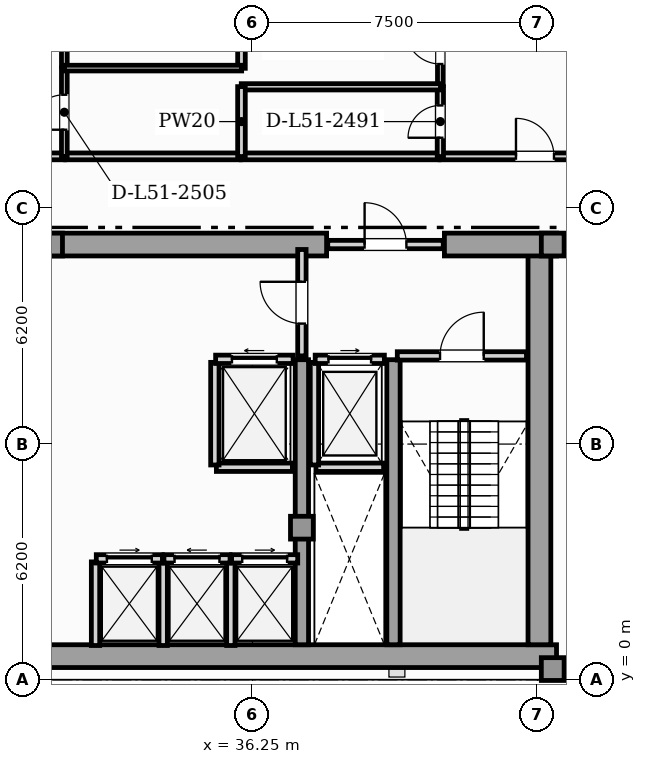
"""IFC4 building model, lengths in metres.
Left out: names, types, materials, properties, quantities, classifications, styles, units other than length and angle.
Written with IfcOpenShell. Run it as: python <this file> out.ifc"""

import sys

from ifc_helpers import new_model, si_unit, direction, frame, frame_2d, origin, origin_2d, place, context, subcontext, project, spatial, rectangle, extrude, element, fill, save


model = new_model("IFC4")
c1 = context("Model", 3, precision=1e-05, world=origin(), true_north=direction((0.0, 1.0)))
c2 = subcontext(c1, "Body", "Model", "MODEL_VIEW")
j1 = project(units=[si_unit("LENGTHUNIT", "METRE"), si_unit("PLANEANGLEUNIT", "RADIAN")], contexts=[c1])
p1 = place(None, origin())
s1 = spatial("IfcSite", under=j1, at=p1, CompositionType="ELEMENT")
p2 = place(p1, origin())
s2 = spatial("IfcBuilding", under=s1, at=p2, CompositionType="ELEMENT")
p3 = place(p2, frame((0.0, 0.0, 208.0)))
s3 = spatial("IfcBuildingStorey", under=s2, at=p3, CompositionType="ELEMENT", Elevation=208.0)
p4 = place(p3, frame((13.25, 0.62, 0.0), z_axis=(0.0, 0.0, 1.0), x_axis=(1.0, 0.0, 0.0)))
e1 = element("IfcWall", 1, at=p4, inside=s3, PredefinedType="SHEAR", context=c2, shape_type="SweptSolid", body=[
    extrude(rectangle(XDim=31.0, YDim=0.6, at=frame_2d((15.5, 0.0))), origin(), (0.0, 0.0, 1.0), 3.63),
])
p5 = place(p3, frame((43.8, 0.92, 0.0), z_axis=(0.0, 0.0, 1.0), x_axis=(0.0, 1.0, 0.0)))
e2 = element("IfcWall", 2, at=p5, inside=s3, PredefinedType="SHEAR", context=c2, shape_type="SweptSolid", body=[
    extrude(rectangle(XDim=10.53, YDim=0.6, at=frame_2d((5.265, 0.0))), origin(), (0.0, 0.0, 1.0), 3.63),
])
p6 = place(p3, frame((30.9, 11.45, 0.0), z_axis=(0.0, 0.0, 1.0), x_axis=(1.0, 0.0, 0.0)))
e3 = element("IfcWall", 3, at=p6, inside=s3, PredefinedType="SHEAR", context=c2, shape_type="SweptSolid", body=[
    extrude(rectangle(XDim=7.3, YDim=0.6, at=frame_2d((3.65, 0.0))), origin(), (0.0, 0.0, 1.0), 3.63),
])
p7 = place(p3, frame((41.3, 11.45, 0.0), z_axis=(0.0, 0.0, 1.0), x_axis=(1.0, 0.0, 0.0)))
e4 = element("IfcWall", 4, at=p7, inside=s3, PredefinedType="SHEAR", context=c2, shape_type="SweptSolid", body=[
    extrude(rectangle(XDim=2.95, YDim=0.6, at=frame_2d((1.475, 0.0))), origin(), (0.0, 0.0, 1.0), 3.63),
])
for number, where, z_axis, x_axis in (
    (5, (37.55, 0.92, 0.0), (0.0, 0.0, 1.0), (0.0, 1.0, 0.0)),
    (6, (39.96, 0.92, 0.0), (0.0, 0.0, 1.0), (0.0, 1.0, 0.0)),
):
    element("IfcWall", number, at=place(p3, frame(where, z_axis=z_axis, x_axis=x_axis)), inside=s3, PredefinedType="SHEAR", context=c2, shape_type="SweptSolid", body=[
        extrude(rectangle(XDim=7.5, YDim=0.35, at=frame_2d((3.75, 0.0))), origin(), (0.0, 0.0, 1.0), 3.63),
    ])
for number, where, z_axis, x_axis in (
    (7, (44.15, 0.28, 0.0), (0.0, 0.0, 1.0), (1.0, 0.0, 0.0)),
    (8, (44.15, 11.45, 0.0), (0.0, 0.0, 1.0), (1.0, 0.0, 0.0)),
    (9, (37.55, 4.0, 0.0), (0.0, 0.0, 1.0), (1.0, 0.0, 0.0)),
    (10, (30.95, 11.45, 0.0), (0.0, 0.0, 1.0), (1.0, 0.0, 0.0)),
):
    element("IfcColumn", number, at=place(p3, frame(where, z_axis=z_axis, x_axis=x_axis)), inside=s3, PredefinedType="COLUMN", context=c2, shape_type="SweptSolid", body=[
        extrude(rectangle(XDim=0.6, YDim=0.6, at=origin_2d()), origin(), (0.0, 0.0, 1.0), 3.85),
    ])
p8 = place(p3, frame((44.25, 0.18, 0.0), z_axis=(0.0, 0.0, 1.0), x_axis=(1.0, 0.0, 0.0)))
e11 = element("IfcWall", 11, at=p8, inside=s3, PredefinedType="SOLIDWALL", context=c2, shape_type="SweptSolid", body=[
    extrude(rectangle(XDim=4.81, YDim=0.3, at=frame_2d((2.405, 0.0))), origin(), (0.0, 0.0, 1.0), 3.63),
])
p9 = place(p8, frame((1.58, 0.0, 0.88)))
e12 = element("IfcOpeningElement", 12, at=p9, cuts=e11, PredefinedType="OPENING", context=c2, shape_type="SweptSolid", body=[
    extrude(rectangle(XDim=1.65, YDim=2.0, at=frame_2d((0.825, 1.0))), frame((0.0, 0.16, 0.0), z_axis=(0.0, -1.0, 0.0), x_axis=(1.0, 0.0, 0.0)), (0.0, 0.0, 1.0), 0.32),
])
p10 = place(p3, frame((37.92, 5.59, 0.0), z_axis=(0.0, 0.0, 1.0), x_axis=(1.0, 0.0, 0.0)))
e13 = element("IfcWall", 13, at=p10, inside=s3, PredefinedType="SOLIDWALL", context=c2, shape_type="SweptSolid", body=[
    extrude(rectangle(XDim=1.78, YDim=0.22, at=frame_2d((0.89, 0.0))), origin(), (0.0, 0.0, 1.0), 3.63),
])
p11 = place(p3, frame((37.88, 5.65, 0.0), z_axis=(0.0, 0.0, 1.0), x_axis=(0.0, 1.0, 0.0)))
e14 = element("IfcWall", 14, at=p11, inside=s3, PredefinedType="SOLIDWALL", context=c2, shape_type="SweptSolid", body=[
    extrude(rectangle(XDim=2.7, YDim=0.22, at=frame_2d((1.35, 0.0))), origin(), (0.0, 0.0, 1.0), 3.63),
])
p12 = place(p3, frame((37.9, 8.43, 0.0), z_axis=(0.0, 0.0, 1.0), x_axis=(1.0, 0.0, 0.0)))
e15 = element("IfcWall", 15, at=p12, inside=s3, PredefinedType="SOLIDWALL", context=c2, shape_type="SweptSolid", body=[
    extrude(rectangle(XDim=1.82, YDim=0.22, at=frame_2d((0.91, 0.0))), origin(), (0.0, 0.0, 1.0), 3.63),
])
p13 = place(p12, frame((0.35, 0.0, 0.0)))
e16 = element("IfcOpeningElement", 16, at=p13, cuts=e15, PredefinedType="OPENING", context=c2, shape_type="SweptSolid", body=[
    extrude(rectangle(XDim=1.12, YDim=2.25, at=frame_2d((0.56, 1.125))), frame((0.0, 0.12, 0.0), z_axis=(0.0, -1.0, 0.0), x_axis=(1.0, 0.0, 0.0)), (0.0, 0.0, 1.0), 0.24),
])
p14 = place(p3, frame((35.3, 5.59, 0.0), z_axis=(0.0, 0.0, 1.0), x_axis=(1.0, 0.0, 0.0)))
e17 = element("IfcWall", 17, at=p14, inside=s3, PredefinedType="SOLIDWALL", context=c2, shape_type="SweptSolid", body=[
    extrude(rectangle(XDim=2.0, YDim=0.22, at=frame_2d((1.0, 0.0))), origin(), (0.0, 0.0, 1.0), 3.63),
])
p15 = place(p3, frame((35.26, 5.65, 0.0), z_axis=(0.0, 0.0, 1.0), x_axis=(0.0, 1.0, 0.0)))
e18 = element("IfcWall", 18, at=p15, inside=s3, PredefinedType="SOLIDWALL", context=c2, shape_type="SweptSolid", body=[
    extrude(rectangle(XDim=2.7, YDim=0.22, at=frame_2d((1.35, 0.0))), origin(), (0.0, 0.0, 1.0), 3.63),
])
p16 = place(p3, frame((35.28, 8.43, 0.0), z_axis=(0.0, 0.0, 1.0), x_axis=(1.0, 0.0, 0.0)))
e19 = element("IfcWall", 19, at=p16, inside=s3, PredefinedType="SOLIDWALL", context=c2, shape_type="SweptSolid", body=[
    extrude(rectangle(XDim=2.04, YDim=0.22, at=frame_2d((1.02, 0.0))), origin(), (0.0, 0.0, 1.0), 3.63),
])
p17 = place(p16, frame((0.43, 0.0, 0.0)))
e20 = element("IfcOpeningElement", 20, at=p17, cuts=e19, PredefinedType="OPENING", context=c2, shape_type="SweptSolid", body=[
    extrude(rectangle(XDim=1.18, YDim=2.2, at=frame_2d((0.59, 1.1))), frame((0.0, 0.12, 0.0), z_axis=(0.0, -1.0, 0.0), x_axis=(1.0, 0.0, 0.0)), (0.0, 0.0, 1.0), 0.24),
])
for number, where, z_axis, x_axis in (
    (21, (32.12, 0.9, 0.0), (0.0, 0.0, 1.0), (0.0, 1.0, 0.0)),
    (22, (33.9, 0.9, 0.0), (0.0, 0.0, 1.0), (0.0, 1.0, 0.0)),
):
    element("IfcWall", number, at=place(p3, frame(where, z_axis=z_axis, x_axis=x_axis)), inside=s3, PredefinedType="SOLIDWALL", context=c2, shape_type="SweptSolid", body=[
        extrude(rectangle(XDim=2.2, YDim=0.22, at=frame_2d((1.1, 0.0))), origin(), (0.0, 0.0, 1.0), 3.63),
    ])
p18 = place(p3, frame((32.14, 3.18, 0.0), z_axis=(0.0, 0.0, 1.0), x_axis=(1.0, 0.0, 0.0)))
e23 = element("IfcWall", 23, at=p18, inside=s3, PredefinedType="SOLIDWALL", context=c2, shape_type="SweptSolid", body=[
    extrude(rectangle(XDim=1.74, YDim=0.22, at=frame_2d((0.87, 0.0))), origin(), (0.0, 0.0, 1.0), 3.63),
])
p19 = place(p18, frame((0.28, 0.0, 0.0)))
e24 = element("IfcOpeningElement", 24, at=p19, cuts=e23, PredefinedType="OPENING", context=c2, shape_type="SweptSolid", body=[
    extrude(rectangle(XDim=1.18, YDim=2.2, at=frame_2d((0.59, 1.1))), frame((0.0, 0.12, 0.0), z_axis=(0.0, -1.0, 0.0), x_axis=(1.0, 0.0, 0.0)), (0.0, 0.0, 1.0), 0.24),
])
p20 = place(p3, frame((35.68, 0.9, 0.0), z_axis=(0.0, 0.0, 1.0), x_axis=(0.0, 1.0, 0.0)))
e25 = element("IfcWall", 25, at=p20, inside=s3, PredefinedType="SOLIDWALL", context=c2, shape_type="SweptSolid", body=[
    extrude(rectangle(XDim=2.2, YDim=0.22, at=frame_2d((1.1, 0.0))), origin(), (0.0, 0.0, 1.0), 3.63),
])
p21 = place(p3, frame((33.92, 3.18, 0.0), z_axis=(0.0, 0.0, 1.0), x_axis=(1.0, 0.0, 0.0)))
e26 = element("IfcWall", 26, at=p21, inside=s3, PredefinedType="SOLIDWALL", context=c2, shape_type="SweptSolid", body=[
    extrude(rectangle(XDim=1.74, YDim=0.22, at=frame_2d((0.87, 0.0))), origin(), (0.0, 0.0, 1.0), 3.63),
])
p22 = place(p21, frame((0.28, 0.0, 0.0)))
e27 = element("IfcOpeningElement", 27, at=p22, cuts=e26, PredefinedType="OPENING", context=c2, shape_type="SweptSolid", body=[
    extrude(rectangle(XDim=1.18, YDim=2.2, at=frame_2d((0.59, 1.1))), frame((0.0, 0.12, 0.0), z_axis=(0.0, -1.0, 0.0), x_axis=(1.0, 0.0, 0.0)), (0.0, 0.0, 1.0), 0.24),
])
p23 = place(p3, frame((35.7, 3.18, 0.0), z_axis=(0.0, 0.0, 1.0), x_axis=(1.0, 0.0, 0.0)))
e28 = element("IfcWall", 28, at=p23, inside=s3, PredefinedType="SOLIDWALL", context=c2, shape_type="SweptSolid", body=[
    extrude(rectangle(XDim=1.74, YDim=0.22, at=frame_2d((0.87, 0.0))), origin(), (0.0, 0.0, 1.0), 3.63),
])
p24 = place(p23, frame((0.28, 0.0, 0.0)))
e29 = element("IfcOpeningElement", 29, at=p24, cuts=e28, PredefinedType="OPENING", context=c2, shape_type="SweptSolid", body=[
    extrude(rectangle(XDim=1.18, YDim=2.2, at=frame_2d((0.59, 1.1))), frame((0.0, 0.12, 0.0), z_axis=(0.0, -1.0, 0.0), x_axis=(1.0, 0.0, 0.0)), (0.0, 0.0, 1.0), 0.24),
])
p25 = place(p3, frame((40.06, 8.52, 0.0), z_axis=(0.0, 0.0, 1.0), x_axis=(1.0, 0.0, 0.0)))
e30 = element("IfcWall", 30, at=p25, inside=s3, PredefinedType="SOLIDWALL", context=c2, shape_type="SweptSolid", body=[
    extrude(rectangle(XDim=3.4, YDim=0.22, at=frame_2d((1.7, 0.0))), origin(), (0.0, 0.0, 1.0), 3.63),
])
p26 = place(p25, frame((1.125, 0.0, 0.0)))
e31 = element("IfcOpeningElement", 31, at=p26, cuts=e30, PredefinedType="OPENING", context=c2, shape_type="SweptSolid", body=[
    extrude(rectangle(XDim=1.15, YDim=2.2, at=frame_2d((0.575, 1.1))), frame((0.0, 0.12, 0.0), z_axis=(0.0, -1.0, 0.0), x_axis=(1.0, 0.0, 0.0)), (0.0, 0.0, 1.0), 0.24),
])
p27 = place(p3, frame((37.55, 8.52, 0.0), z_axis=(0.0, 0.0, 1.0), x_axis=(0.0, 1.0, 0.0)))
e32 = element("IfcWall", 32, at=p27, inside=s3, PredefinedType="SOLIDWALL", context=c2, shape_type="SweptSolid", body=[
    extrude(rectangle(XDim=2.8, YDim=0.22, at=frame_2d((1.4, 0.0))), origin(), (0.0, 0.0, 1.0), 3.085),
])
p28 = place(p27, frame((0.85, 0.0, 0.0)))
e33 = element("IfcOpeningElement", 33, at=p28, cuts=e32, PredefinedType="OPENING", context=c2, shape_type="SweptSolid", body=[
    extrude(rectangle(XDim=1.1, YDim=2.2, at=frame_2d((0.55, 1.1))), frame((0.0, 0.12, 0.0), z_axis=(0.0, -1.0, 0.0), x_axis=(1.0, 0.0, 0.0)), (0.0, 0.0, 1.0), 0.24),
])
p29 = place(p3, frame((38.23, 11.45, 0.0), z_axis=(0.0, 0.0, 1.0), x_axis=(1.0, 0.0, 0.0)))
e34 = element("IfcWall", 34, at=p29, inside=s3, PredefinedType="SOLIDWALL", context=c2, shape_type="SweptSolid", body=[
    extrude(rectangle(XDim=3.04, YDim=0.22, at=frame_2d((1.52, 0.0))), origin(), (0.0, 0.0, 1.0), 3.63),
])
p30 = place(p29, frame((0.97, 0.0, 0.0)))
e35 = element("IfcOpeningElement", 35, at=p30, cuts=e34, PredefinedType="OPENING", context=c2, shape_type="SweptSolid", body=[
    extrude(rectangle(XDim=1.1, YDim=2.2, at=frame_2d((0.55, 1.1))), frame((0.0, 0.12, 0.0), z_axis=(0.0, -1.0, 0.0), x_axis=(1.0, 0.0, 0.0)), (0.0, 0.0, 1.0), 0.24),
])
p31 = place(p3, frame((44.355, 11.6, 0.0), z_axis=(0.0, 0.0, 1.0), x_axis=(1.0, 0.0, 0.0)))
e36 = element("IfcWall", 36, at=p31, inside=s3, PredefinedType="PARTITIONING", context=c2, shape_type="SweptSolid", body=[
    extrude(rectangle(XDim=7.772, YDim=0.18, at=frame_2d((3.886, 0.0))), origin(), (0.0, 0.0, 1.0), 3.63),
])
p32 = place(p31, frame((3.386, 0.0, 0.0)))
e37 = element("IfcOpeningElement", 37, at=p32, cuts=e36, PredefinedType="OPENING", context=c2, shape_type="SweptSolid", body=[
    extrude(rectangle(XDim=1.0, YDim=2.15, at=frame_2d((0.5, 1.075))), frame((0.0, 0.1, 0.0), z_axis=(0.0, -1.0, 0.0), x_axis=(1.0, 0.0, 0.0)), (0.0, 0.0, 1.0), 0.2),
])
p33 = place(p3, frame((41.188, 13.77, 0.0), z_axis=(0.0, 0.0, 1.0), x_axis=(1.0, 0.0, 0.0)))
e38 = element("IfcWall", 38, at=p33, inside=s3, PredefinedType="PARTITIONING", context=c2, shape_type="SweptSolid", body=[
    extrude(rectangle(XDim=4.99, YDim=0.18, at=frame_2d((2.495, 0.0))), origin(), (0.0, 0.0, 1.0), 3.63),
])
p34 = place(p33, frame((1.995, 0.0, 0.0)))
e39 = element("IfcOpeningElement", 39, at=p34, cuts=e38, PredefinedType="OPENING", context=c2, shape_type="SweptSolid", body=[
    extrude(rectangle(XDim=1.0, YDim=2.15, at=frame_2d((0.5, 1.075))), frame((0.0, 0.1, 0.0), z_axis=(0.0, -1.0, 0.0), x_axis=(1.0, 0.0, 0.0)), (0.0, 0.0, 1.0), 0.2),
])
p35 = place(p3, frame((35.955, 13.77, 0.0), z_axis=(0.0, 0.0, 1.0), x_axis=(1.0, 0.0, 0.0)))
e40 = element("IfcWall", 40, at=p35, inside=s3, PredefinedType="PARTITIONING", context=c2, shape_type="SweptSolid", body=[
    extrude(rectangle(XDim=5.203, YDim=0.18, at=frame_2d((2.602, 0.0))), origin(), (0.0, 0.0, 1.0), 3.63),
])
p36 = place(p3, frame((26.314, 13.77, 0.0), z_axis=(0.0, 0.0, 1.0), x_axis=(1.0, 0.0, 0.0)))
e41 = element("IfcWall", 41, at=p36, inside=s3, PredefinedType="PARTITIONING", context=c2, shape_type="SweptSolid", body=[
    extrude(rectangle(XDim=4.99, YDim=0.18, at=frame_2d((2.495, 0.0))), origin(), (0.0, 0.0, 1.0), 3.63),
])
p37 = place(p36, frame((1.995, 0.0, 0.0)))
e42 = element("IfcOpeningElement", 42, at=p37, cuts=e41, PredefinedType="OPENING", context=c2, shape_type="SweptSolid", body=[
    extrude(rectangle(XDim=1.0, YDim=2.15, at=frame_2d((0.5, 1.075))), frame((0.0, 0.1, 0.0), z_axis=(0.0, -1.0, 0.0), x_axis=(1.0, 0.0, 0.0)), (0.0, 0.0, 1.0), 0.2),
])
p38 = place(p3, frame((31.334, 13.77, 0.0), z_axis=(0.0, 0.0, 1.0), x_axis=(1.0, 0.0, 0.0)))
e43 = element("IfcWall", 43, at=p38, inside=s3, PredefinedType="PARTITIONING", context=c2, shape_type="SweptSolid", body=[
    extrude(rectangle(XDim=4.591, YDim=0.18, at=frame_2d((2.295, 0.0))), origin(), (0.0, 0.0, 1.0), 3.63),
])
p39 = place(p3, frame((41.193, 13.765, 0.0), z_axis=(0.0, 0.0, 1.0), x_axis=(0.0, 1.0, 0.0)))
e44 = element("IfcWall", 44, at=p39, inside=s3, PredefinedType="PLUMBINGWALL", context=c2, shape_type="SweptSolid", body=[
    extrude(rectangle(XDim=1.84, YDim=0.165, at=frame_2d((0.92, 0.0))), origin(), (0.0, 0.0, 1.0), 3.63),
])
p40 = place(p39, frame((0.495, 0.0, 0.0)))
e45 = element("IfcOpeningElement", 45, at=p40, cuts=e44, PredefinedType="OPENING", context=c2, shape_type="SweptSolid", body=[
    extrude(rectangle(XDim=0.85, YDim=2.1, at=frame_2d((0.425, 1.05))), frame((0.0, 0.093, 0.0), z_axis=(0.0, -1.0, 0.0), x_axis=(1.0, 0.0, 0.0)), (0.0, 0.0, 1.0), 0.185),
])
p41 = place(p3, frame((41.193, 15.635, 0.0), z_axis=(0.0, 0.0, 1.0), x_axis=(0.0, 1.0, 0.0)))
e46 = element("IfcWall", 46, at=p41, inside=s3, PredefinedType="PARTITIONING", context=c2, shape_type="SweptSolid", body=[
    extrude(rectangle(XDim=2.05, YDim=0.15, at=frame_2d((1.025, 0.0))), origin(), (0.0, 0.0, 1.0), 3.63),
])
p42 = place(p41, frame((0.565, 0.0, 0.0)))
e47 = element("IfcOpeningElement", 47, at=p42, cuts=e46, PredefinedType="OPENING", context=c2, shape_type="SweptSolid", body=[
    extrude(rectangle(XDim=0.92, YDim=2.1, at=frame_2d((0.46, 1.05))), frame((0.0, 0.085, 0.0), z_axis=(0.0, -1.0, 0.0), x_axis=(1.0, 0.0, 0.0)), (0.0, 0.0, 1.0), 0.17),
])
p43 = place(p3, frame((35.955, 15.6, 0.0), z_axis=(0.0, 0.0, 1.0), x_axis=(1.0, 0.0, 0.0)))
e48 = element("IfcWall", 48, at=p43, inside=s3, PredefinedType="PLUMBINGWALL", context=c2, shape_type="SweptSolid", body=[
    extrude(rectangle(XDim=5.243, YDim=0.165, at=frame_2d((2.622, 0.0))), origin(), (0.0, 0.0, 1.0), 3.63),
])
p44 = place(p3, frame((35.96, 13.765, 0.0), z_axis=(0.0, 0.0, 1.0), x_axis=(0.0, 1.0, 0.0)))
e49 = element("IfcWall", 49, at=p44, inside=s3, PredefinedType="PARTITIONING", context=c2, shape_type="SweptSolid", body=[
    extrude(rectangle(XDim=1.84, YDim=0.2, at=frame_2d((0.92, 0.0))), origin(), (0.0, 0.0, 1.0), 3.63),
])
p45 = place(p3, frame((35.96, 16.087, 0.0), z_axis=(0.0, 0.0, 1.0), x_axis=(0.0, 1.0, 0.0)))
e50 = element("IfcWall", 50, at=p45, inside=s3, PredefinedType="PARTITIONING", context=c2, shape_type="SweptSolid", body=[
    extrude(rectangle(XDim=1.597, YDim=0.2, at=frame_2d((0.799, 0.0))), origin(), (0.0, 0.0, 1.0), 3.63),
])
p46 = place(p3, frame((31.299, 13.765, 0.0), z_axis=(0.0, 0.0, 1.0), x_axis=(0.0, 1.0, 0.0)))
e51 = element("IfcWall", 51, at=p46, inside=s3, PredefinedType="PARTITIONING", context=c2, shape_type="SweptSolid", body=[
    extrude(rectangle(XDim=2.333, YDim=0.15, at=frame_2d((1.166, 0.0))), origin(), (0.0, 0.0, 1.0), 3.63),
])
p47 = place(p46, frame((0.706, 0.0, 0.0)))
e52 = element("IfcOpeningElement", 52, at=p47, cuts=e51, PredefinedType="OPENING", context=c2, shape_type="SweptSolid", body=[
    extrude(rectangle(XDim=0.92, YDim=2.1, at=frame_2d((0.46, 1.05))), frame((0.0, 0.085, 0.0), z_axis=(0.0, -1.0, 0.0), x_axis=(1.0, 0.0, 0.0)), (0.0, 0.0, 1.0), 0.17),
])
p48 = place(p3, frame((31.299, 16.127, 0.0), z_axis=(0.0, 0.0, 1.0), x_axis=(0.0, 1.0, 0.0)))
e53 = element("IfcWall", 53, at=p48, inside=s3, PredefinedType="PARTITIONING", context=c2, shape_type="SweptSolid", body=[
    extrude(rectangle(XDim=0.807, YDim=0.15, at=frame_2d((0.403, 0.0))), origin(), (0.0, 0.0, 1.0), 3.63),
])
p49 = place(p3, frame((31.294, 16.093, 0.0), z_axis=(0.0, 0.0, 1.0), x_axis=(1.0, 0.0, 0.0)))
e54 = element("IfcWall", 54, at=p49, inside=s3, PredefinedType="PARTITIONING", context=c2, shape_type="SweptSolid", body=[
    extrude(rectangle(XDim=4.671, YDim=0.15, at=frame_2d((2.335, 0.0))), origin(), (0.0, 0.0, 1.0), 3.63),
])
p50 = place(p13, origin())
e55 = element("IfcDoor", 55, at=p50, inside=s3, OperationType="SLIDING_TO_RIGHT", PredefinedType="DOOR", context=c2, shape_type="SweptSolid", body=[
    extrude(rectangle(XDim=1.12, YDim=2.25, at=frame_2d((0.56, 1.125))), frame((0.0, 0.025, 0.0), z_axis=(0.0, -1.0, 0.0), x_axis=(1.0, 0.0, 0.0)), (0.0, 0.0, 1.0), 0.05),
])
fill(e16, e55)
p51 = place(p17, origin())
e56 = element("IfcDoor", 56, at=p51, inside=s3, OperationType="SLIDING_TO_LEFT", PredefinedType="DOOR", context=c2, shape_type="SweptSolid", body=[
    extrude(rectangle(XDim=1.18, YDim=2.2, at=frame_2d((0.59, 1.1))), frame((0.0, 0.025, 0.0), z_axis=(0.0, -1.0, 0.0), x_axis=(1.0, 0.0, 0.0)), (0.0, 0.0, 1.0), 0.05),
])
fill(e20, e56)
p52 = place(p19, origin())
e57 = element("IfcDoor", 57, at=p52, inside=s3, OperationType="SLIDING_TO_RIGHT", PredefinedType="DOOR", context=c2, shape_type="SweptSolid", body=[
    extrude(rectangle(XDim=1.18, YDim=2.2, at=frame_2d((0.59, 1.1))), frame((0.0, 0.025, 0.0), z_axis=(0.0, -1.0, 0.0), x_axis=(1.0, 0.0, 0.0)), (0.0, 0.0, 1.0), 0.05),
])
fill(e24, e57)
p53 = place(p22, origin())
e58 = element("IfcDoor", 58, at=p53, inside=s3, OperationType="SLIDING_TO_LEFT", PredefinedType="DOOR", context=c2, shape_type="SweptSolid", body=[
    extrude(rectangle(XDim=1.18, YDim=2.2, at=frame_2d((0.59, 1.1))), frame((0.0, 0.025, 0.0), z_axis=(0.0, -1.0, 0.0), x_axis=(1.0, 0.0, 0.0)), (0.0, 0.0, 1.0), 0.05),
])
fill(e27, e58)
p54 = place(p24, origin())
e59 = element("IfcDoor", 59, at=p54, inside=s3, OperationType="SLIDING_TO_RIGHT", PredefinedType="DOOR", context=c2, shape_type="SweptSolid", body=[
    extrude(rectangle(XDim=1.18, YDim=2.2, at=frame_2d((0.59, 1.1))), frame((0.0, 0.025, 0.0), z_axis=(0.0, -1.0, 0.0), x_axis=(1.0, 0.0, 0.0)), (0.0, 0.0, 1.0), 0.05),
])
fill(e29, e59)
p55 = place(p26, origin())
e60 = element("IfcDoor", 60, at=p55, inside=s3, OperationType="SINGLE_SWING_RIGHT", PredefinedType="DOOR", context=c2, shape_type="SweptSolid", body=[
    extrude(rectangle(XDim=1.15, YDim=2.2, at=frame_2d((0.575, 1.1))), frame((0.0, 0.025, 0.0), z_axis=(0.0, -1.0, 0.0), x_axis=(1.0, 0.0, 0.0)), (0.0, 0.0, 1.0), 0.05),
])
fill(e31, e60)
p56 = place(p28, origin())
e61 = element("IfcDoor", 61, at=p56, inside=s3, OperationType="SINGLE_SWING_RIGHT", PredefinedType="DOOR", context=c2, shape_type="SweptSolid", body=[
    extrude(rectangle(XDim=1.1, YDim=2.2, at=frame_2d((0.55, 1.1))), frame((0.0, 0.025, 0.0), z_axis=(0.0, -1.0, 0.0), x_axis=(1.0, 0.0, 0.0)), (0.0, 0.0, 1.0), 0.05),
])
fill(e33, e61)
p57 = place(p30, origin())
e62 = element("IfcDoor", 62, at=p57, inside=s3, OperationType="SINGLE_SWING_LEFT", PredefinedType="DOOR", context=c2, shape_type="SweptSolid", body=[
    extrude(rectangle(XDim=1.1, YDim=2.2, at=frame_2d((0.55, 1.1))), frame((0.0, 0.025, 0.0), z_axis=(0.0, -1.0, 0.0), x_axis=(1.0, 0.0, 0.0)), (0.0, 0.0, 1.0), 0.05),
])
fill(e35, e62)
p58 = place(p34, origin())
e63 = element("IfcDoor", 63, at=p58, inside=s3, OperationType="SINGLE_SWING_LEFT", PredefinedType="DOOR", context=c2, shape_type="SweptSolid", body=[
    extrude(rectangle(XDim=1.0, YDim=2.15, at=frame_2d((0.5, 1.075))), frame((0.0, 0.025, 0.0), z_axis=(0.0, -1.0, 0.0), x_axis=(1.0, 0.0, 0.0)), (0.0, 0.0, 1.0), 0.05),
])
fill(e39, e63)
p59 = place(p40, origin())
e64 = element("IfcDoor", 64, at=p59, inside=s3, OperationType="SINGLE_SWING_LEFT", PredefinedType="DOOR", context=c2, shape_type="SweptSolid", body=[
    extrude(rectangle(XDim=0.85, YDim=2.1, at=frame_2d((0.425, 1.05))), frame((0.0, 0.025, 0.0), z_axis=(0.0, -1.0, 0.0), x_axis=(1.0, 0.0, 0.0)), (0.0, 0.0, 1.0), 0.05),
])
fill(e45, e64)
p60 = place(p42, origin())
e65 = element("IfcDoor", 65, at=p60, inside=s3, OperationType="SINGLE_SWING_RIGHT", PredefinedType="DOOR", context=c2, shape_type="SweptSolid", body=[
    extrude(rectangle(XDim=0.92, YDim=2.1, at=frame_2d((0.46, 1.05))), frame((0.0, 0.025, 0.0), z_axis=(0.0, -1.0, 0.0), x_axis=(1.0, 0.0, 0.0)), (0.0, 0.0, 1.0), 0.05),
])
fill(e47, e65)
p61 = place(p47, origin())
e66 = element("IfcDoor", 66, at=p61, inside=s3, OperationType="SINGLE_SWING_LEFT", PredefinedType="DOOR", context=c2, shape_type="SweptSolid", body=[
    extrude(rectangle(XDim=0.92, YDim=2.1, at=frame_2d((0.46, 1.05))), frame((0.0, 0.025, 0.0), z_axis=(0.0, -1.0, 0.0), x_axis=(1.0, 0.0, 0.0)), (0.0, 0.0, 1.0), 0.05),
])
fill(e52, e66)
save(model, sys.argv[1])
